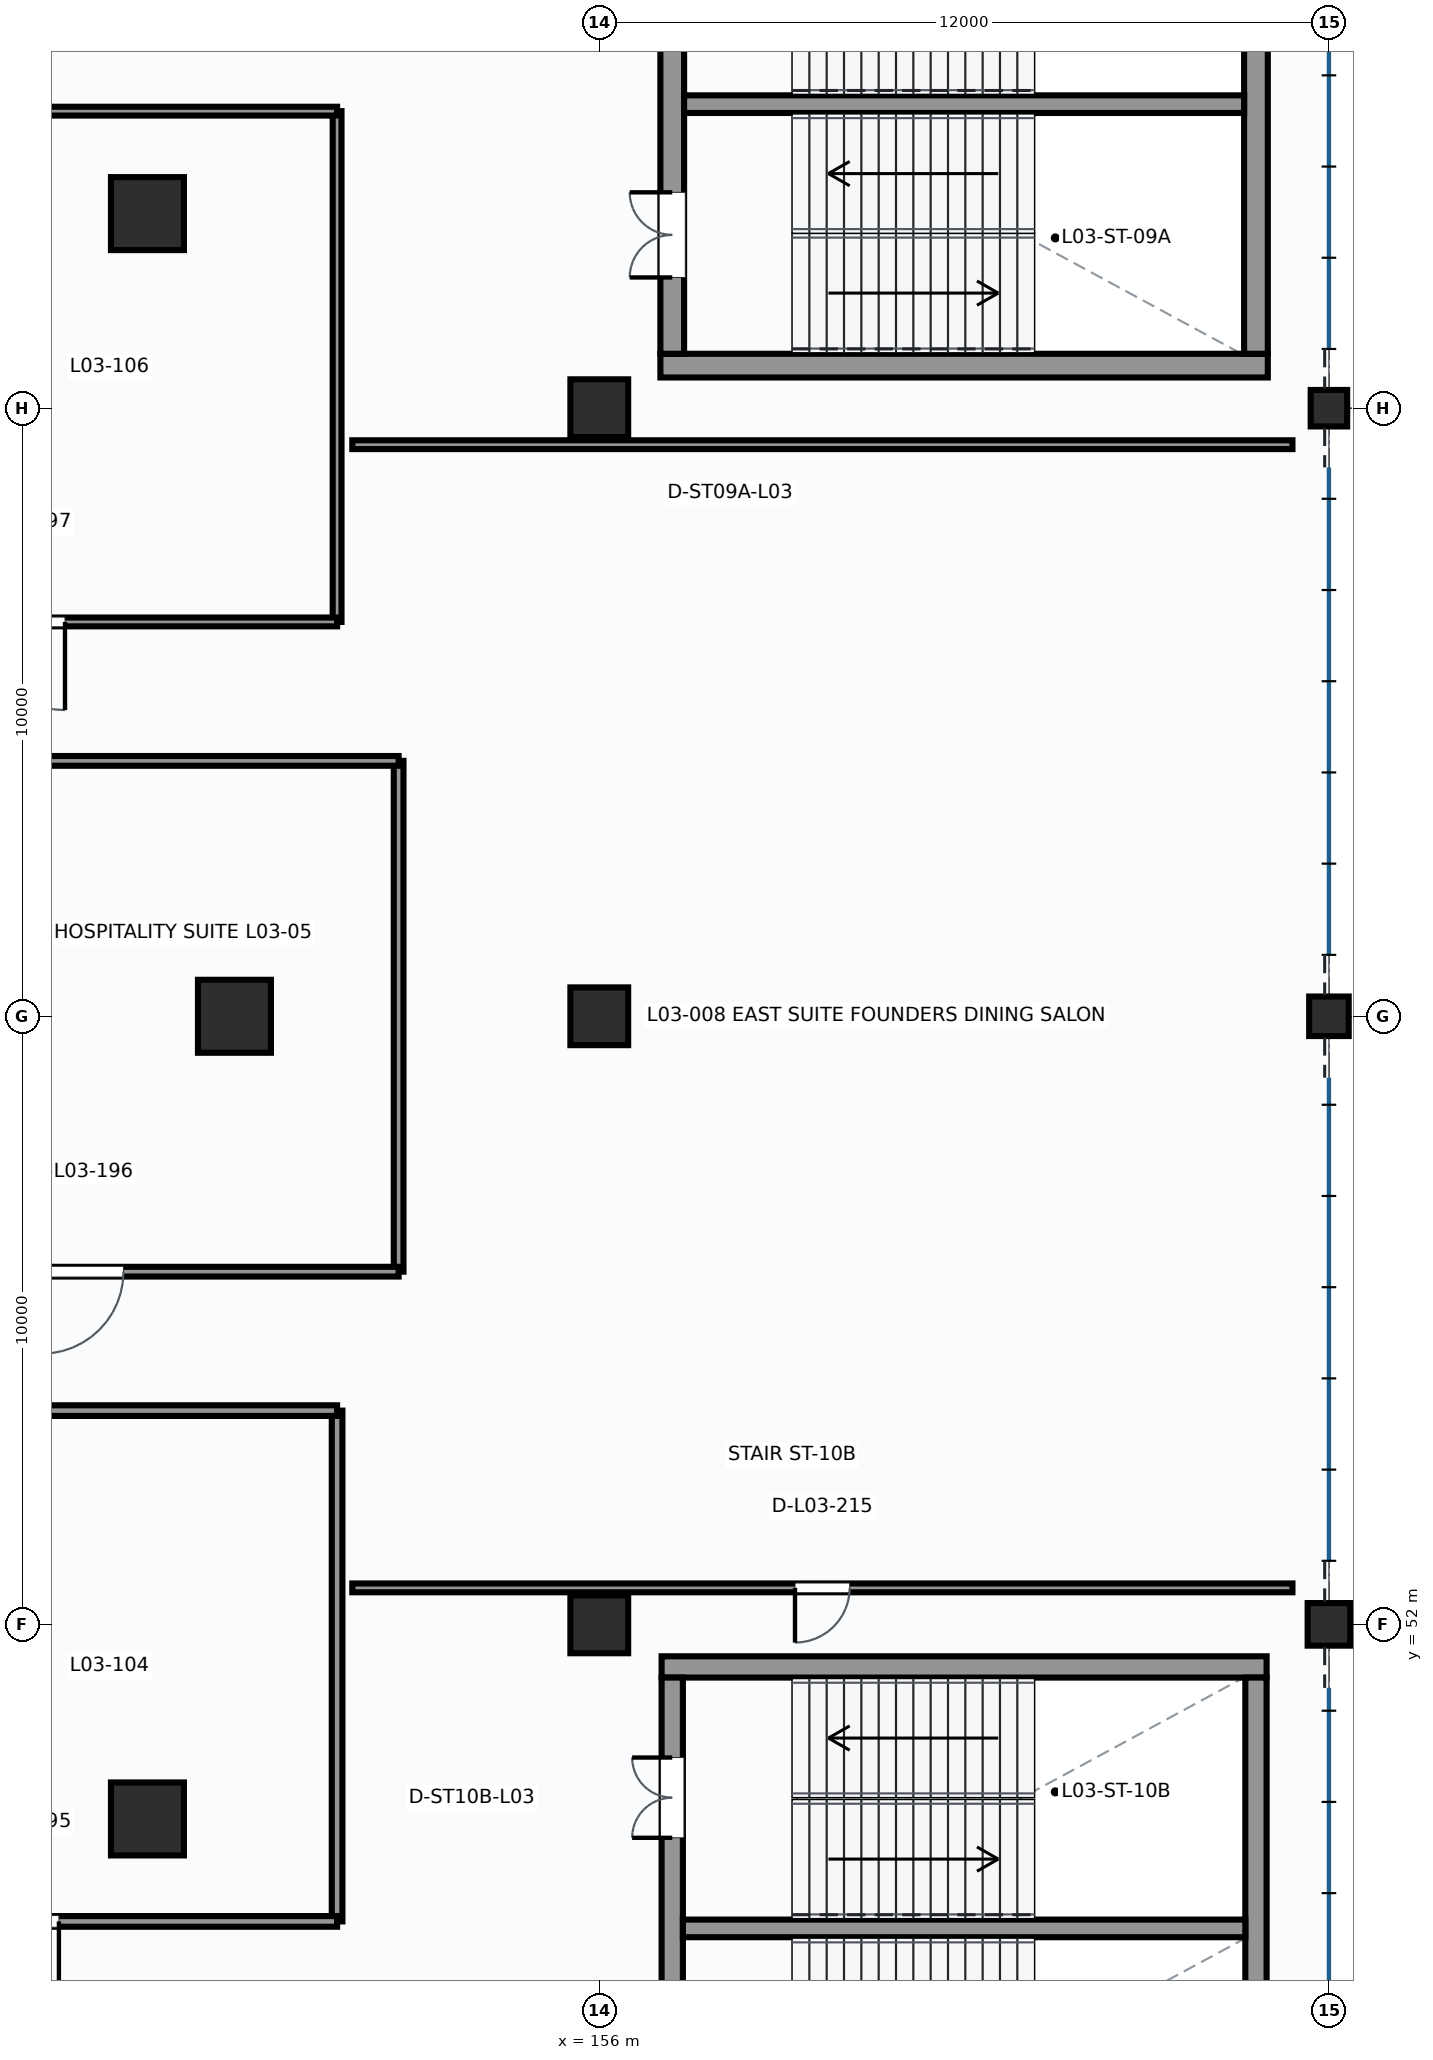
"""IFC4 building model, lengths in metres.
Left out: names, types, materials, properties, quantities, classifications, styles, units other than length and angle.
Written with IfcOpenShell. Run it as: python <this file> out.ifc"""

import sys

from ifc_helpers import new_model, si_unit, direction, frame, frame_2d, origin, origin_2d, place, context, subcontext, project, spatial, rectangle, extrude, element, fill, save


model = new_model("IFC4")
c1 = context("Model", 3, precision=1e-05, world=origin(), true_north=direction((0.0, 1.0)))
c2 = subcontext(c1, "Body", "Model", "MODEL_VIEW")
j1 = project(units=[si_unit("LENGTHUNIT", "METRE"), si_unit("PLANEANGLEUNIT", "RADIAN")], contexts=[c1])
p1 = place(None, origin())
s1 = spatial("IfcSite", under=j1, at=p1, CompositionType="ELEMENT")
p2 = place(p1, origin())
s2 = spatial("IfcBuilding", under=s1, at=p2, CompositionType="ELEMENT")
p3 = place(p2, frame((0.0, 0.0, 14.7)))
s3 = spatial("IfcBuildingStorey", under=s2, at=p3, CompositionType="ELEMENT", Elevation=14.7)
for number, where, z_axis, x_axis in (
    (1, (156.0, 52.0, 0.0), (0.0, 0.0, 1.0), (1.0, 0.0, 0.0)),
    (2, (156.0, 62.0, 0.0), (0.0, 0.0, 1.0), (1.0, 0.0, 0.0)),
    (3, (156.0, 72.0, 0.0), (0.0, 0.0, 1.0), (1.0, 0.0, 0.0)),
):
    element("IfcColumn", number, at=place(p3, frame(where, z_axis=z_axis, x_axis=x_axis)), inside=s3, PredefinedType="COLUMN", context=c2, shape_type="SweptSolid", body=[
        extrude(rectangle(XDim=0.95, YDim=0.95, at=origin_2d()), origin(), (0.0, 0.0, 1.0), 4.5),
    ])
p4 = place(p3, frame((168.0, 52.0, 0.0), z_axis=(0.0, 0.0, 1.0), x_axis=(1.0, 0.0, 0.0)))
e4 = element("IfcColumn", 4, at=p4, inside=s3, PredefinedType="COLUMN", context=c2, shape_type="SweptSolid", body=[
    extrude(rectangle(XDim=0.7, YDim=0.7, at=origin_2d()), origin(), (0.0, 0.0, 1.0), 4.5),
])
p5 = place(p3, frame((168.0, 62.0, 0.0), z_axis=(0.0, 0.0, 1.0), x_axis=(1.0, 0.0, 0.0)))
e5 = element("IfcColumn", 5, at=p5, inside=s3, PredefinedType="COLUMN", context=c2, shape_type="SweptSolid", body=[
    extrude(rectangle(XDim=0.65, YDim=0.65, at=origin_2d()), origin(), (0.0, 0.0, 1.0), 4.5),
])
p6 = place(p3, frame((168.0, 72.0, 0.0), z_axis=(0.0, 0.0, 1.0), x_axis=(1.0, 0.0, 0.0)))
e6 = element("IfcColumn", 6, at=p6, inside=s3, PredefinedType="COLUMN", context=c2, shape_type="SweptSolid", body=[
    extrude(rectangle(XDim=0.6, YDim=0.6, at=origin_2d()), origin(), (0.0, 0.0, 1.0), 4.5),
])
for number, where, z_axis, x_axis in (
    (7, (150.0, 62.0, 0.0), (0.0, 0.0, 1.0), (1.0, 0.0, 0.0)),
    (8, (148.569, 75.2, 0.0), (0.0, 0.0, 1.0), (1.0, 0.0, 0.0)),
    (9, (148.569, 48.8, 0.0), (0.0, 0.0, 1.0), (1.0, 0.0, 0.0)),
):
    element("IfcColumn", number, at=place(p3, frame(where, z_axis=z_axis, x_axis=x_axis)), inside=s3, PredefinedType="COLUMN", context=c2, shape_type="SweptSolid", body=[
        extrude(rectangle(XDim=1.2, YDim=1.2, at=origin_2d()), origin(), (0.0, 0.0, 1.0), 4.5),
    ])
p7 = place(p3, frame((157.005, 72.7, 0.0), z_axis=(0.0, 0.0, 1.0), x_axis=(1.0, 0.0, 0.0)))
e10 = element("IfcWall", 10, at=p7, inside=s3, PredefinedType="SHEAR", context=c2, shape_type="SweptSolid", body=[
    extrude(rectangle(XDim=9.99, YDim=0.39, at=frame_2d((4.995, 0.0))), origin(), (0.0, 0.0, 1.0), 4.5),
])
p8 = place(p3, frame((157.2, 72.895, 0.0), z_axis=(0.0, 0.0, 1.0), x_axis=(0.0, 1.0, 0.0)))
e11 = element("IfcWall", 11, at=p8, inside=s3, PredefinedType="SHEAR", context=c2, shape_type="SweptSolid", body=[
    extrude(rectangle(XDim=8.21, YDim=0.39, at=frame_2d((4.105, 0.0))), origin(), (0.0, 0.0, 1.0), 4.5),
])
p9 = place(p8, frame((1.255, 0.0, 0.0)))
e12 = element("IfcOpeningElement", 12, at=p9, cuts=e11, PredefinedType="OPENING", context=c2, shape_type="SweptSolid", body=[
    extrude(rectangle(XDim=1.4, YDim=2.2, at=frame_2d((0.7, 1.1))), frame((0.0, 0.205, 0.0), z_axis=(0.0, -1.0, 0.0), x_axis=(1.0, 0.0, 0.0)), (0.0, 0.0, 1.0), 0.41),
])
p10 = place(p8, frame((5.595, 0.0, 0.0)))
e13 = element("IfcOpeningElement", 13, at=p10, cuts=e11, PredefinedType="OPENING", context=c2, shape_type="SweptSolid", body=[
    extrude(rectangle(XDim=1.32, YDim=2.2, at=frame_2d((0.66, 1.1))), frame((0.0, 0.205, 0.0), z_axis=(0.0, -1.0, 0.0), x_axis=(1.0, 0.0, 0.0)), (0.0, 0.0, 1.0), 0.41),
])
p11 = place(p3, frame((166.8, 72.895, 0.0), z_axis=(0.0, 0.0, 1.0), x_axis=(0.0, 1.0, 0.0)))
e14 = element("IfcWall", 14, at=p11, inside=s3, PredefinedType="SHEAR", context=c2, shape_type="SweptSolid", body=[
    extrude(rectangle(XDim=8.21, YDim=0.39, at=frame_2d((4.105, 0.0))), origin(), (0.0, 0.0, 1.0), 4.5),
])
p12 = place(p3, frame((157.395, 77.0, 0.0), z_axis=(0.0, 0.0, 1.0), x_axis=(1.0, 0.0, 0.0)))
e15 = element("IfcWall", 15, at=p12, inside=s3, PredefinedType="SHEAR", context=c2, shape_type="SweptSolid", body=[
    extrude(rectangle(XDim=9.21, YDim=0.29, at=frame_2d((4.605, 0.0))), origin(), (0.0, 0.0, 1.0), 4.5),
])
p13 = place(p3, frame((157.025, 51.3, 0.0), z_axis=(0.0, 0.0, 1.0), x_axis=(1.0, 0.0, 0.0)))
e16 = element("IfcWall", 16, at=p13, inside=s3, PredefinedType="SHEAR", context=c2, shape_type="SweptSolid", body=[
    extrude(rectangle(XDim=9.95, YDim=0.35, at=frame_2d((4.975, 0.0))), origin(), (0.0, 0.0, 1.0), 4.5),
])
p14 = place(p3, frame((157.2, 42.875, 0.0), z_axis=(0.0, 0.0, 1.0), x_axis=(0.0, 1.0, 0.0)))
e17 = element("IfcWall", 17, at=p14, inside=s3, PredefinedType="SHEAR", context=c2, shape_type="SweptSolid", body=[
    extrude(rectangle(XDim=8.25, YDim=0.35, at=frame_2d((4.125, 0.0))), origin(), (0.0, 0.0, 1.0), 4.5),
])
p15 = place(p14, frame((1.275, 0.0, 0.0)))
e18 = element("IfcOpeningElement", 18, at=p15, cuts=e17, PredefinedType="OPENING", context=c2, shape_type="SweptSolid", body=[
    extrude(rectangle(XDim=1.4, YDim=2.2, at=frame_2d((0.7, 1.1))), frame((0.0, 0.185, 0.0), z_axis=(0.0, -1.0, 0.0), x_axis=(1.0, 0.0, 0.0)), (0.0, 0.0, 1.0), 0.37),
])
p16 = place(p14, frame((5.615, 0.0, 0.0)))
e19 = element("IfcOpeningElement", 19, at=p16, cuts=e17, PredefinedType="OPENING", context=c2, shape_type="SweptSolid", body=[
    extrude(rectangle(XDim=1.32, YDim=2.2, at=frame_2d((0.66, 1.1))), frame((0.0, 0.185, 0.0), z_axis=(0.0, -1.0, 0.0), x_axis=(1.0, 0.0, 0.0)), (0.0, 0.0, 1.0), 0.37),
])
p17 = place(p3, frame((166.8, 42.875, 0.0), z_axis=(0.0, 0.0, 1.0), x_axis=(0.0, 1.0, 0.0)))
e20 = element("IfcWall", 20, at=p17, inside=s3, PredefinedType="SHEAR", context=c2, shape_type="SweptSolid", body=[
    extrude(rectangle(XDim=8.25, YDim=0.35, at=frame_2d((4.125, 0.0))), origin(), (0.0, 0.0, 1.0), 4.5),
])
p18 = place(p3, frame((157.375, 47.0, 0.0), z_axis=(0.0, 0.0, 1.0), x_axis=(1.0, 0.0, 0.0)))
e21 = element("IfcWall", 21, at=p18, inside=s3, PredefinedType="SHEAR", context=c2, shape_type="SweptSolid", body=[
    extrude(rectangle(XDim=9.25, YDim=0.29, at=frame_2d((4.625, 0.0))), origin(), (0.0, 0.0, 1.0), 4.5),
])
p19 = place(p3, frame((151.688, 55.515, 0.0), z_axis=(0.0, 0.0, 1.0), x_axis=(0.0, -1.0, 0.0)))
e22 = element("IfcWall", 22, at=p19, inside=s3, PredefinedType="PARTITIONING", context=c2, shape_type="SweptSolid", body=[
    extrude(rectangle(XDim=8.4, YDim=0.175, at=frame_2d((4.2, 0.0))), origin(), (0.0, 0.0, 1.0), 4.16),
])
p20 = place(p3, frame((151.688, 47.115, 0.0), z_axis=(0.0, 0.0, 1.0), x_axis=(-1.0, 0.0, 0.0)))
e23 = element("IfcWall", 23, at=p20, inside=s3, PredefinedType="PARTITIONING", context=c2, shape_type="SweptSolid", body=[
    extrude(rectangle(XDim=10.4, YDim=0.175, at=frame_2d((5.2, 0.0))), origin(), (0.0, 0.0, 1.0), 2.679),
])
p21 = place(p20, frame((4.575, 0.0, 0.0)))
e24 = element("IfcOpeningElement", 24, at=p21, cuts=e23, PredefinedType="OPENING", context=c2, shape_type="SweptSolid", body=[
    extrude(rectangle(XDim=1.25, YDim=2.25, at=frame_2d((0.625, 1.125))), frame((0.0, 0.097, 0.0), z_axis=(0.0, -1.0, 0.0), x_axis=(1.0, 0.0, 0.0)), (0.0, 0.0, 1.0), 0.195),
])
p22 = place(p3, frame((141.288, 55.515, 0.0), z_axis=(0.0, 0.0, 1.0), x_axis=(1.0, 0.0, 0.0)))
e25 = element("IfcWall", 25, at=p22, inside=s3, PredefinedType="PARTITIONING", context=c2, shape_type="SweptSolid", body=[
    extrude(rectangle(XDim=10.4, YDim=0.175, at=frame_2d((5.2, 0.0))), origin(), (0.0, 0.0, 1.0), 2.679),
])
p23 = place(p3, frame((152.7, 66.2, 0.0), z_axis=(0.0, 0.0, 1.0), x_axis=(0.0, -1.0, 0.0)))
e26 = element("IfcWall", 26, at=p23, inside=s3, PredefinedType="PARTITIONING", context=c2, shape_type="SweptSolid", body=[
    extrude(rectangle(XDim=8.4, YDim=0.16, at=frame_2d((4.2, 0.0))), origin(), (0.0, 0.0, 1.0), 4.16),
])
p24 = place(p3, frame((152.7, 57.8, 0.0), z_axis=(0.0, 0.0, 1.0), x_axis=(-1.0, 0.0, 0.0)))
e27 = element("IfcWall", 27, at=p24, inside=s3, PredefinedType="PARTITIONING", context=c2, shape_type="SweptSolid", body=[
    extrude(rectangle(XDim=10.4, YDim=0.16, at=frame_2d((5.2, 0.0))), origin(), (0.0, 0.0, 1.0), 2.679),
])
p25 = place(p24, frame((4.525, 0.0, 0.0)))
e28 = element("IfcOpeningElement", 28, at=p25, cuts=e27, PredefinedType="OPENING", context=c2, shape_type="SweptSolid", body=[
    extrude(rectangle(XDim=1.35, YDim=2.3, at=frame_2d((0.675, 1.15))), frame((0.0, 0.09, 0.0), z_axis=(0.0, -1.0, 0.0), x_axis=(1.0, 0.0, 0.0)), (0.0, 0.0, 1.0), 0.18),
])
p26 = place(p3, frame((142.3, 66.2, 0.0), z_axis=(0.0, 0.0, 1.0), x_axis=(1.0, 0.0, 0.0)))
e29 = element("IfcWall", 29, at=p26, inside=s3, PredefinedType="PARTITIONING", context=c2, shape_type="SweptSolid", body=[
    extrude(rectangle(XDim=10.4, YDim=0.16, at=frame_2d((5.2, 0.0))), origin(), (0.0, 0.0, 1.0), 2.53),
])
p27 = place(p3, frame((151.688, 76.885, 0.0), z_axis=(0.0, 0.0, 1.0), x_axis=(0.0, -1.0, 0.0)))
e30 = element("IfcWall", 30, at=p27, inside=s3, PredefinedType="PARTITIONING", context=c2, shape_type="SweptSolid", body=[
    extrude(rectangle(XDim=8.4, YDim=0.145, at=frame_2d((4.2, 0.0))), origin(), (0.0, 0.0, 1.0), 4.16),
])
p28 = place(p3, frame((151.688, 68.485, 0.0), z_axis=(0.0, 0.0, 1.0), x_axis=(-1.0, 0.0, 0.0)))
e31 = element("IfcWall", 31, at=p28, inside=s3, PredefinedType="PARTITIONING", context=c2, shape_type="SweptSolid", body=[
    extrude(rectangle(XDim=10.4, YDim=0.145, at=frame_2d((5.2, 0.0))), origin(), (0.0, 0.0, 1.0), 2.53),
])
p29 = place(p28, frame((4.475, 0.0, 0.0)))
e32 = element("IfcOpeningElement", 32, at=p29, cuts=e31, PredefinedType="OPENING", context=c2, shape_type="SweptSolid", body=[
    extrude(rectangle(XDim=1.45, YDim=2.3, at=frame_2d((0.725, 1.15))), frame((0.0, 0.083, 0.0), z_axis=(0.0, -1.0, 0.0), x_axis=(1.0, 0.0, 0.0)), (0.0, 0.0, 1.0), 0.165),
])
p30 = place(p3, frame((141.288, 76.885, 0.0), z_axis=(0.0, 0.0, 1.0), x_axis=(1.0, 0.0, 0.0)))
e33 = element("IfcWall", 33, at=p30, inside=s3, PredefinedType="PARTITIONING", context=c2, shape_type="SweptSolid", body=[
    extrude(rectangle(XDim=10.4, YDim=0.145, at=frame_2d((5.2, 0.0))), origin(), (0.0, 0.0, 1.0), 2.53),
])
p31 = place(p3, frame((167.4, 52.6, 0.0), z_axis=(0.0, 0.0, 1.0), x_axis=(-1.0, 0.0, 0.0)))
e34 = element("IfcWall", 34, at=p31, inside=s3, PredefinedType="PARTITIONING", context=c2, shape_type="SweptSolid", body=[
    extrude(rectangle(XDim=15.462, YDim=0.145, at=frame_2d((7.731, 0.0))), origin(), (0.0, 0.0, 1.0), 3.289),
])
p32 = place(p31, frame((7.281, 0.0, 0.0)))
e35 = element("IfcOpeningElement", 35, at=p32, cuts=e34, PredefinedType="OPENING", context=c2, shape_type="SweptSolid", body=[
    extrude(rectangle(XDim=0.9, YDim=2.1, at=frame_2d((0.45, 1.05))), frame((0.0, 0.083, 0.0), z_axis=(0.0, -1.0, 0.0), x_axis=(1.0, 0.0, 0.0)), (0.0, 0.0, 1.0), 0.165),
])
p33 = place(p3, frame((151.938, 71.4, 0.0), z_axis=(0.0, 0.0, 1.0), x_axis=(1.0, 0.0, 0.0)))
e36 = element("IfcWall", 36, at=p33, inside=s3, PredefinedType="PARTITIONING", context=c2, shape_type="SweptSolid", body=[
    extrude(rectangle(XDim=15.462, YDim=0.145, at=frame_2d((7.731, 0.0))), origin(), (0.0, 0.0, 1.0), 3.37),
])
p34 = place(p9, origin())
e37 = element("IfcDoor", 37, at=p34, inside=s3, OperationType="DOUBLE_DOOR_SINGLE_SWING", PredefinedType="DOOR", context=c2, shape_type="SweptSolid", body=[
    extrude(rectangle(XDim=1.4, YDim=2.2, at=frame_2d((0.7, 1.1))), frame((0.0, 0.025, 0.0), z_axis=(0.0, -1.0, 0.0), x_axis=(1.0, 0.0, 0.0)), (0.0, 0.0, 1.0), 0.05),
])
fill(e12, e37)
p35 = place(p16, origin())
e38 = element("IfcDoor", 38, at=p35, inside=s3, OperationType="DOUBLE_DOOR_SINGLE_SWING", PredefinedType="DOOR", context=c2, shape_type="SweptSolid", body=[
    extrude(rectangle(XDim=1.32, YDim=2.2, at=frame_2d((0.66, 1.1))), frame((0.0, 0.025, 0.0), z_axis=(0.0, -1.0, 0.0), x_axis=(1.0, 0.0, 0.0)), (0.0, 0.0, 1.0), 0.05),
])
fill(e19, e38)
p36 = place(p21, origin())
e39 = element("IfcDoor", 39, at=p36, inside=s3, OperationType="SINGLE_SWING_LEFT", PredefinedType="DOOR", context=c2, shape_type="SweptSolid", body=[
    extrude(rectangle(XDim=1.25, YDim=2.25, at=frame_2d((0.625, 1.125))), frame((0.0, 0.025, 0.0), z_axis=(0.0, -1.0, 0.0), x_axis=(1.0, 0.0, 0.0)), (0.0, 0.0, 1.0), 0.05),
])
fill(e24, e39)
p37 = place(p25, origin())
e40 = element("IfcDoor", 40, at=p37, inside=s3, OperationType="SINGLE_SWING_RIGHT", PredefinedType="DOOR", context=c2, shape_type="SweptSolid", body=[
    extrude(rectangle(XDim=1.35, YDim=2.3, at=frame_2d((0.675, 1.15))), frame((0.0, 0.025, 0.0), z_axis=(0.0, -1.0, 0.0), x_axis=(1.0, 0.0, 0.0)), (0.0, 0.0, 1.0), 0.05),
])
fill(e28, e40)
p38 = place(p29, origin())
e41 = element("IfcDoor", 41, at=p38, inside=s3, OperationType="SINGLE_SWING_LEFT", PredefinedType="DOOR", context=c2, shape_type="SweptSolid", body=[
    extrude(rectangle(XDim=1.45, YDim=2.3, at=frame_2d((0.725, 1.15))), frame((0.0, 0.025, 0.0), z_axis=(0.0, -1.0, 0.0), x_axis=(1.0, 0.0, 0.0)), (0.0, 0.0, 1.0), 0.05),
])
fill(e32, e41)
p39 = place(p32, origin())
e42 = element("IfcDoor", 42, at=p39, inside=s3, OperationType="SINGLE_SWING_RIGHT", PredefinedType="DOOR", context=c2, shape_type="SweptSolid", body=[
    extrude(rectangle(XDim=0.9, YDim=2.1, at=frame_2d((0.45, 1.05))), frame((0.0, 0.025, 0.0), z_axis=(0.0, -1.0, 0.0), x_axis=(1.0, 0.0, 0.0)), (0.0, 0.0, 1.0), 0.05),
])
fill(e35, e42)
save(model, sys.argv[1])
